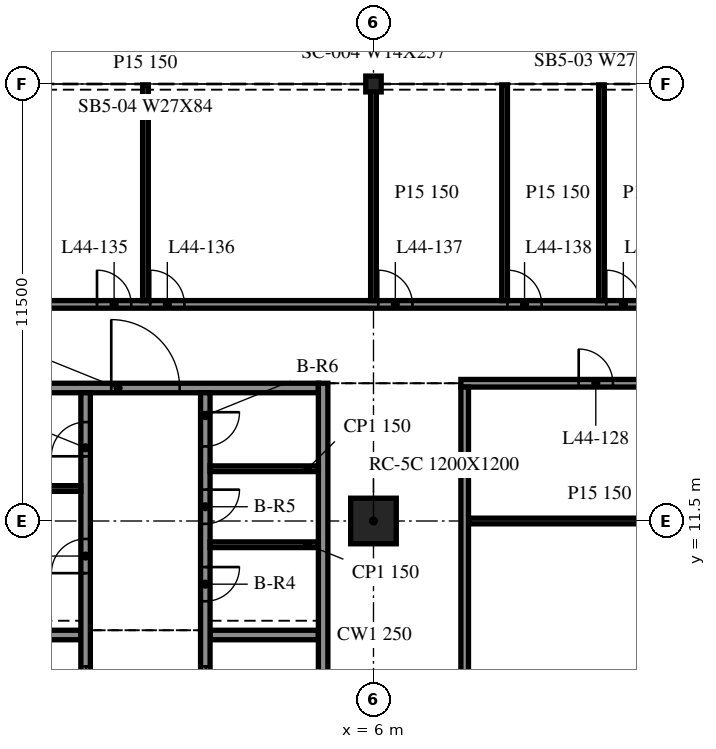
"""IFC4 building model, lengths in metres.
Left out: names, types, materials, properties, quantities, classifications, styles, units other than length and angle.
Written with IfcOpenShell. Run it as: python <this file> out.ifc"""

import sys

from ifc_helpers import new_model, si_unit, direction, frame, frame_2d, origin, origin_2d, place, context, subcontext, project, spatial, rectangle, i_section, extrude, element, fill, save


model = new_model("IFC4")
c1 = context("Model", 3, precision=1e-05, world=origin(), true_north=direction((0.0, 1.0)))
c2 = subcontext(c1, "Body", "Model", "MODEL_VIEW")
j1 = project(units=[si_unit("LENGTHUNIT", "METRE"), si_unit("PLANEANGLEUNIT", "RADIAN")], contexts=[c1])
p1 = place(None, origin())
s1 = spatial("IfcSite", under=j1, at=p1, CompositionType="ELEMENT")
p2 = place(p1, origin())
s2 = spatial("IfcBuilding", under=s1, at=p2, CompositionType="ELEMENT")
p3 = place(p2, frame((0.0, 0.0, 185.8)))
s3 = spatial("IfcBuildingStorey", under=s2, at=p3, CompositionType="ELEMENT", Elevation=185.8)
p4 = place(p3, frame((6.0, 11.5, -0.34), z_axis=(0.0, 0.0, 1.0), x_axis=(1.0, 0.0, 0.0)))
e1 = element("IfcColumn", 1, at=p4, inside=s3, PredefinedType="COLUMN", context=c2, shape_type="SweptSolid", body=[
    extrude(rectangle(XDim=1.2, YDim=1.2, at=origin_2d()), origin(), (0.0, 0.0, 1.0), 3.74),
])
p5 = place(p3, frame((6.0, 23.0, -0.34), z_axis=(0.0, 0.0, 1.0), x_axis=(1.0, 0.0, 0.0)))
e2 = element("IfcColumn", 2, at=p5, inside=s3, PredefinedType="COLUMN", context=c2, shape_type="SweptSolid", body=[
    extrude(i_section(OverallWidth=0.406, OverallDepth=0.417, WebThickness=0.03, FlangeThickness=0.048, at=origin_2d()), origin(), (0.0, 0.0, 1.0), 3.74),
])
p6 = place(p3, frame((4.675, -9.125, 0.0), z_axis=(0.0, 0.0, 1.0), x_axis=(0.0, 1.0, 0.0)))
e3 = element("IfcWall", 3, at=p6, inside=s3, PredefinedType="SOLIDWALL", context=c2, shape_type="SweptSolid", body=[
    extrude(rectangle(XDim=24.25, YDim=0.25, at=frame_2d((12.125, 0.0))), origin(), (0.0, 0.0, 1.0), 3.4),
])
p7 = place(p3, frame((-4.55, 15.0, 0.0), z_axis=(0.0, 0.0, 1.0), x_axis=(1.0, 0.0, 0.0)))
e4 = element("IfcWall", 4, at=p7, inside=s3, PredefinedType="SOLIDWALL", context=c2, shape_type="SweptSolid", body=[
    extrude(rectangle(XDim=9.1, YDim=0.25, at=frame_2d((4.55, 0.0))), origin(), (0.0, 0.0, 1.0), 3.4),
])
p8 = place(p7, frame((3.65, 0.0, 0.0)))
e5 = element("IfcOpeningElement", 5, at=p8, cuts=e4, PredefinedType="OPENING", context=c2, shape_type="SweptSolid", body=[
    extrude(rectangle(XDim=1.8, YDim=2.1, at=frame_2d((0.9, 1.05))), frame((0.0, 0.135, 0.0), z_axis=(0.0, -1.0, 0.0), x_axis=(1.0, 0.0, 0.0)), (0.0, 0.0, 1.0), 0.27),
])
p9 = place(p3, frame((-1.575, -8.875, 0.0), z_axis=(0.0, 0.0, 1.0), x_axis=(0.0, 1.0, 0.0)))
e6 = element("IfcWall", 6, at=p9, inside=s3, PredefinedType="SOLIDWALL", context=c2, shape_type="SweptSolid", body=[
    extrude(rectangle(XDim=23.75, YDim=0.25, at=frame_2d((11.875, 0.0))), origin(), (0.0, 0.0, 1.0), 3.4),
])
p10 = place(p9, frame((7.2, 0.0, 0.0)))
e7 = element("IfcOpeningElement", 7, at=p10, cuts=e6, PredefinedType="OPENING", context=c2, shape_type="SweptSolid", body=[
    extrude(rectangle(XDim=1.1, YDim=2.1, at=frame_2d((0.55, 1.05))), frame((0.0, 0.135, 0.0), z_axis=(0.0, -1.0, 0.0), x_axis=(1.0, 0.0, 0.0)), (0.0, 0.0, 1.0), 0.27),
])
p11 = place(p9, frame((9.95, 0.0, 0.0)))
e8 = element("IfcOpeningElement", 8, at=p11, cuts=e6, PredefinedType="OPENING", context=c2, shape_type="SweptSolid", body=[
    extrude(rectangle(XDim=1.1, YDim=2.1, at=frame_2d((0.55, 1.05))), frame((0.0, 0.135, 0.0), z_axis=(0.0, -1.0, 0.0), x_axis=(1.0, 0.0, 0.0)), (0.0, 0.0, 1.0), 0.27),
])
p12 = place(p9, frame((12.7, 0.0, 0.0)))
e9 = element("IfcOpeningElement", 9, at=p12, cuts=e6, PredefinedType="OPENING", context=c2, shape_type="SweptSolid", body=[
    extrude(rectangle(XDim=1.1, YDim=2.1, at=frame_2d((0.55, 1.05))), frame((0.0, 0.135, 0.0), z_axis=(0.0, -1.0, 0.0), x_axis=(1.0, 0.0, 0.0)), (0.0, 0.0, 1.0), 0.27),
])
p13 = place(p9, frame((15.45, 0.0, 0.0)))
e10 = element("IfcOpeningElement", 10, at=p13, cuts=e6, PredefinedType="OPENING", context=c2, shape_type="SweptSolid", body=[
    extrude(rectangle(XDim=1.1, YDim=2.1, at=frame_2d((0.55, 1.05))), frame((0.0, 0.135, 0.0), z_axis=(0.0, -1.0, 0.0), x_axis=(1.0, 0.0, 0.0)), (0.0, 0.0, 1.0), 0.27),
])
p14 = place(p9, frame((2.55, 0.0, 0.0)))
e11 = element("IfcOpeningElement", 11, at=p14, cuts=e6, PredefinedType="OPENING", context=c2, shape_type="SweptSolid", body=[
    extrude(rectangle(XDim=0.9, YDim=2.1, at=frame_2d((0.45, 1.05))), frame((0.0, 0.135, 0.0), z_axis=(0.0, -1.0, 0.0), x_axis=(1.0, 0.0, 0.0)), (0.0, 0.0, 1.0), 0.27),
])
p15 = place(p9, frame((19.002, 0.0, 0.0)))
e12 = element("IfcOpeningElement", 12, at=p15, cuts=e6, PredefinedType="OPENING", context=c2, shape_type="SweptSolid", body=[
    extrude(rectangle(XDim=0.9, YDim=2.1, at=frame_2d((0.45, 1.05))), frame((0.0, 0.135, 0.0), z_axis=(0.0, -1.0, 0.0), x_axis=(1.0, 0.0, 0.0)), (0.0, 0.0, 1.0), 0.27),
])
p16 = place(p9, frame((22.077, 0.0, 0.0)))
e13 = element("IfcOpeningElement", 13, at=p16, cuts=e6, PredefinedType="OPENING", context=c2, shape_type="SweptSolid", body=[
    extrude(rectangle(XDim=0.9, YDim=2.1, at=frame_2d((0.45, 1.05))), frame((0.0, 0.135, 0.0), z_axis=(0.0, -1.0, 0.0), x_axis=(1.0, 0.0, 0.0)), (0.0, 0.0, 1.0), 0.27),
])
p17 = place(p3, frame((1.575, 14.875, 0.0), z_axis=(0.0, 0.0, 1.0), x_axis=(0.0, -1.0, 0.0)))
e14 = element("IfcWall", 14, at=p17, inside=s3, PredefinedType="SOLIDWALL", context=c2, shape_type="SweptSolid", body=[
    extrude(rectangle(XDim=17.5, YDim=0.25, at=frame_2d((8.75, 0.0))), origin(), (0.0, 0.0, 1.0), 3.4),
])
p18 = place(p17, frame((15.45, 0.0, 0.0)))
e15 = element("IfcOpeningElement", 15, at=p18, cuts=e14, PredefinedType="OPENING", context=c2, shape_type="SweptSolid", body=[
    extrude(rectangle(XDim=1.1, YDim=2.1, at=frame_2d((0.55, 1.05))), frame((0.0, 0.135, 0.0), z_axis=(0.0, -1.0, 0.0), x_axis=(1.0, 0.0, 0.0)), (0.0, 0.0, 1.0), 0.27),
])
p19 = place(p17, frame((12.7, 0.0, 0.0)))
e16 = element("IfcOpeningElement", 16, at=p19, cuts=e14, PredefinedType="OPENING", context=c2, shape_type="SweptSolid", body=[
    extrude(rectangle(XDim=1.1, YDim=2.1, at=frame_2d((0.55, 1.05))), frame((0.0, 0.135, 0.0), z_axis=(0.0, -1.0, 0.0), x_axis=(1.0, 0.0, 0.0)), (0.0, 0.0, 1.0), 0.27),
])
p20 = place(p17, frame((9.95, 0.0, 0.0)))
e17 = element("IfcOpeningElement", 17, at=p20, cuts=e14, PredefinedType="OPENING", context=c2, shape_type="SweptSolid", body=[
    extrude(rectangle(XDim=1.1, YDim=2.1, at=frame_2d((0.55, 1.05))), frame((0.0, 0.135, 0.0), z_axis=(0.0, -1.0, 0.0), x_axis=(1.0, 0.0, 0.0)), (0.0, 0.0, 1.0), 0.27),
])
p21 = place(p17, frame((7.2, 0.0, 0.0)))
e18 = element("IfcOpeningElement", 18, at=p21, cuts=e14, PredefinedType="OPENING", context=c2, shape_type="SweptSolid", body=[
    extrude(rectangle(XDim=1.1, YDim=2.1, at=frame_2d((0.55, 1.05))), frame((0.0, 0.135, 0.0), z_axis=(0.0, -1.0, 0.0), x_axis=(1.0, 0.0, 0.0)), (0.0, 0.0, 1.0), 0.27),
])
p22 = place(p17, frame((4.587, 0.0, 0.0)))
e19 = element("IfcOpeningElement", 19, at=p22, cuts=e14, PredefinedType="OPENING", context=c2, shape_type="SweptSolid", body=[
    extrude(rectangle(XDim=0.9, YDim=2.1, at=frame_2d((0.45, 1.05))), frame((0.0, 0.135, 0.0), z_axis=(0.0, -1.0, 0.0), x_axis=(1.0, 0.0, 0.0)), (0.0, 0.0, 1.0), 0.27),
])
p23 = place(p17, frame((2.55, 0.0, 0.0)))
e20 = element("IfcOpeningElement", 20, at=p23, cuts=e14, PredefinedType="OPENING", context=c2, shape_type="SweptSolid", body=[
    extrude(rectangle(XDim=0.9, YDim=2.1, at=frame_2d((0.45, 1.05))), frame((0.0, 0.135, 0.0), z_axis=(0.0, -1.0, 0.0), x_axis=(1.0, 0.0, 0.0)), (0.0, 0.0, 1.0), 0.27),
])
p24 = place(p17, frame((0.512, 0.0, 0.0)))
e21 = element("IfcOpeningElement", 21, at=p24, cuts=e14, PredefinedType="OPENING", context=c2, shape_type="SweptSolid", body=[
    extrude(rectangle(XDim=0.9, YDim=2.1, at=frame_2d((0.45, 1.05))), frame((0.0, 0.135, 0.0), z_axis=(0.0, -1.0, 0.0), x_axis=(1.0, 0.0, 0.0)), (0.0, 0.0, 1.0), 0.27),
])
for number, where, z_axis, x_axis in (
    (22, (-4.55, 8.5, 0.0), (0.0, 0.0, 1.0), (1.0, 0.0, 0.0)),
    (23, (1.7, 8.5, 0.0), (0.0, 0.0, 1.0), (1.0, 0.0, 0.0)),
):
    element("IfcWall", number, at=place(p3, frame(where, z_axis=z_axis, x_axis=x_axis)), inside=s3, PredefinedType="SOLIDWALL", context=c2, shape_type="SweptSolid", body=[
        extrude(rectangle(XDim=2.85, YDim=0.25, at=frame_2d((1.425, 0.0))), origin(), (0.0, 0.0, 1.0), 3.4),
    ])
for number, where, z_axis, x_axis in (
    (24, (-4.55, 12.355, 0.0), (0.0, 0.0, 1.0), (1.0, 0.0, 0.0)),
    (25, (1.7, 10.875, 0.0), (0.0, 0.0, 1.0), (1.0, 0.0, 0.0)),
    (26, (1.7, 12.875, 0.0), (0.0, 0.0, 1.0), (1.0, 0.0, 0.0)),
):
    element("IfcWall", number, at=place(p3, frame(where, z_axis=z_axis, x_axis=x_axis)), inside=s3, PredefinedType="PARTITIONING", context=c2, shape_type="SweptSolid", body=[
        extrude(rectangle(XDim=2.85, YDim=0.15, at=frame_2d((1.425, 0.0))), origin(), (0.0, 0.0, 1.0), 3.4),
    ])
p25 = place(p3, frame((8.5, 11.5, 0.0), z_axis=(0.0, 0.0, 1.0), x_axis=(1.0, 0.0, 0.0)))
e27 = element("IfcWall", 27, at=p25, inside=s3, PredefinedType="PARTITIONING", context=c2, shape_type="SweptSolid", body=[
    extrude(rectangle(XDim=6.9, YDim=0.15, at=frame_2d((3.45, 0.0))), origin(), (0.0, 0.0, 1.0), 3.4),
])
p26 = place(p3, frame((8.3, 15.125, 0.0), z_axis=(0.0, 0.0, 1.0), x_axis=(1.0, 0.0, 0.0)))
e28 = element("IfcWall", 28, at=p26, inside=s3, PredefinedType="PARTITIONING", context=c2, shape_type="SweptSolid", body=[
    extrude(rectangle(XDim=7.3, YDim=0.2, at=frame_2d((3.65, 0.0))), origin(), (0.0, 0.0, 1.0), 3.4),
])
p27 = place(p26, frame((3.1, 0.0, 0.0)))
e29 = element("IfcOpeningElement", 29, at=p27, cuts=e28, PredefinedType="OPENING", context=c2, shape_type="SweptSolid", body=[
    extrude(rectangle(XDim=0.9, YDim=2.1, at=frame_2d((0.45, 1.05))), frame((0.0, 0.11, 0.0), z_axis=(0.0, -1.0, 0.0), x_axis=(1.0, 0.0, 0.0)), (0.0, 0.0, 1.0), 0.22),
])
p28 = place(p3, frame((-47.975, 17.2, 0.0), z_axis=(0.0, 0.0, 1.0), x_axis=(1.0, 0.0, 0.0)))
e30 = element("IfcWall", 30, at=p28, inside=s3, PredefinedType="PARTITIONING", context=c2, shape_type="SweptSolid", body=[
    extrude(rectangle(XDim=95.95, YDim=0.2, at=frame_2d((47.975, 0.0))), origin(), (0.0, 0.0, 1.0), 3.4),
])
p29 = place(p28, frame((7.7, 0.0, 0.0)))
e31 = element("IfcOpeningElement", 31, at=p29, cuts=e30, PredefinedType="OPENING", context=c2, shape_type="SweptSolid", body=[
    extrude(rectangle(XDim=0.9, YDim=2.1, at=frame_2d((0.45, 1.05))), frame((0.0, 0.11, 0.0), z_axis=(0.0, -1.0, 0.0), x_axis=(1.0, 0.0, 0.0)), (0.0, 0.0, 1.0), 0.22),
])
p30 = place(p28, frame((16.7, 0.0, 0.0)))
e32 = element("IfcOpeningElement", 32, at=p30, cuts=e30, PredefinedType="OPENING", context=c2, shape_type="SweptSolid", body=[
    extrude(rectangle(XDim=0.9, YDim=2.1, at=frame_2d((0.45, 1.05))), frame((0.0, 0.11, 0.0), z_axis=(0.0, -1.0, 0.0), x_axis=(1.0, 0.0, 0.0)), (0.0, 0.0, 1.0), 0.22),
])
p31 = place(p28, frame((22.7, 0.0, 0.0)))
e33 = element("IfcOpeningElement", 33, at=p31, cuts=e30, PredefinedType="OPENING", context=c2, shape_type="SweptSolid", body=[
    extrude(rectangle(XDim=0.9, YDim=2.1, at=frame_2d((0.45, 1.05))), frame((0.0, 0.11, 0.0), z_axis=(0.0, -1.0, 0.0), x_axis=(1.0, 0.0, 0.0)), (0.0, 0.0, 1.0), 0.22),
])
p32 = place(p28, frame((26.1, 0.0, 0.0)))
e34 = element("IfcOpeningElement", 34, at=p32, cuts=e30, PredefinedType="OPENING", context=c2, shape_type="SweptSolid", body=[
    extrude(rectangle(XDim=0.9, YDim=2.1, at=frame_2d((0.45, 1.05))), frame((0.0, 0.11, 0.0), z_axis=(0.0, -1.0, 0.0), x_axis=(1.0, 0.0, 0.0)), (0.0, 0.0, 1.0), 0.22),
])
p33 = place(p28, frame((28.7, 0.0, 0.0)))
e35 = element("IfcOpeningElement", 35, at=p33, cuts=e30, PredefinedType="OPENING", context=c2, shape_type="SweptSolid", body=[
    extrude(rectangle(XDim=0.9, YDim=2.1, at=frame_2d((0.45, 1.05))), frame((0.0, 0.11, 0.0), z_axis=(0.0, -1.0, 0.0), x_axis=(1.0, 0.0, 0.0)), (0.0, 0.0, 1.0), 0.22),
])
p34 = place(p28, frame((37.7, 0.0, 0.0)))
e36 = element("IfcOpeningElement", 36, at=p34, cuts=e30, PredefinedType="OPENING", context=c2, shape_type="SweptSolid", body=[
    extrude(rectangle(XDim=0.9, YDim=2.1, at=frame_2d((0.45, 1.05))), frame((0.0, 0.11, 0.0), z_axis=(0.0, -1.0, 0.0), x_axis=(1.0, 0.0, 0.0)), (0.0, 0.0, 1.0), 0.22),
])
p35 = place(p28, frame((46.7, 0.0, 0.0)))
e37 = element("IfcOpeningElement", 37, at=p35, cuts=e30, PredefinedType="OPENING", context=c2, shape_type="SweptSolid", body=[
    extrude(rectangle(XDim=0.9, YDim=2.1, at=frame_2d((0.45, 1.05))), frame((0.0, 0.11, 0.0), z_axis=(0.0, -1.0, 0.0), x_axis=(1.0, 0.0, 0.0)), (0.0, 0.0, 1.0), 0.22),
])
p36 = place(p28, frame((48.1, 0.0, 0.0)))
e38 = element("IfcOpeningElement", 38, at=p36, cuts=e30, PredefinedType="OPENING", context=c2, shape_type="SweptSolid", body=[
    extrude(rectangle(XDim=0.9, YDim=2.1, at=frame_2d((0.45, 1.05))), frame((0.0, 0.11, 0.0), z_axis=(0.0, -1.0, 0.0), x_axis=(1.0, 0.0, 0.0)), (0.0, 0.0, 1.0), 0.22),
])
p37 = place(p28, frame((54.1, 0.0, 0.0)))
e39 = element("IfcOpeningElement", 39, at=p37, cuts=e30, PredefinedType="OPENING", context=c2, shape_type="SweptSolid", body=[
    extrude(rectangle(XDim=0.9, YDim=2.1, at=frame_2d((0.45, 1.05))), frame((0.0, 0.11, 0.0), z_axis=(0.0, -1.0, 0.0), x_axis=(1.0, 0.0, 0.0)), (0.0, 0.0, 1.0), 0.22),
])
p38 = place(p28, frame((57.5, 0.0, 0.0)))
e40 = element("IfcOpeningElement", 40, at=p38, cuts=e30, PredefinedType="OPENING", context=c2, shape_type="SweptSolid", body=[
    extrude(rectangle(XDim=0.9, YDim=2.1, at=frame_2d((0.45, 1.05))), frame((0.0, 0.11, 0.0), z_axis=(0.0, -1.0, 0.0), x_axis=(1.0, 0.0, 0.0)), (0.0, 0.0, 1.0), 0.22),
])
p39 = place(p28, frame((60.1, 0.0, 0.0)))
e41 = element("IfcOpeningElement", 41, at=p39, cuts=e30, PredefinedType="OPENING", context=c2, shape_type="SweptSolid", body=[
    extrude(rectangle(XDim=0.9, YDim=2.1, at=frame_2d((0.45, 1.05))), frame((0.0, 0.11, 0.0), z_axis=(0.0, -1.0, 0.0), x_axis=(1.0, 0.0, 0.0)), (0.0, 0.0, 1.0), 0.22),
])
p40 = place(p28, frame((69.1, 0.0, 0.0)))
e42 = element("IfcOpeningElement", 42, at=p40, cuts=e30, PredefinedType="OPENING", context=c2, shape_type="SweptSolid", body=[
    extrude(rectangle(XDim=0.9, YDim=2.1, at=frame_2d((0.45, 1.05))), frame((0.0, 0.11, 0.0), z_axis=(0.0, -1.0, 0.0), x_axis=(1.0, 0.0, 0.0)), (0.0, 0.0, 1.0), 0.22),
])
p41 = place(p28, frame((78.1, 0.0, 0.0)))
e43 = element("IfcOpeningElement", 43, at=p41, cuts=e30, PredefinedType="OPENING", context=c2, shape_type="SweptSolid", body=[
    extrude(rectangle(XDim=0.9, YDim=2.1, at=frame_2d((0.45, 1.05))), frame((0.0, 0.11, 0.0), z_axis=(0.0, -1.0, 0.0), x_axis=(1.0, 0.0, 0.0)), (0.0, 0.0, 1.0), 0.22),
])
p42 = place(p28, frame((84.1, 0.0, 0.0)))
e44 = element("IfcOpeningElement", 44, at=p42, cuts=e30, PredefinedType="OPENING", context=c2, shape_type="SweptSolid", body=[
    extrude(rectangle(XDim=0.9, YDim=2.1, at=frame_2d((0.45, 1.05))), frame((0.0, 0.11, 0.0), z_axis=(0.0, -1.0, 0.0), x_axis=(1.0, 0.0, 0.0)), (0.0, 0.0, 1.0), 0.22),
])
p43 = place(p28, frame((87.5, 0.0, 0.0)))
e45 = element("IfcOpeningElement", 45, at=p43, cuts=e30, PredefinedType="OPENING", context=c2, shape_type="SweptSolid", body=[
    extrude(rectangle(XDim=0.9, YDim=2.1, at=frame_2d((0.45, 1.05))), frame((0.0, 0.11, 0.0), z_axis=(0.0, -1.0, 0.0), x_axis=(1.0, 0.0, 0.0)), (0.0, 0.0, 1.0), 0.22),
])
p44 = place(p28, frame((90.1, 0.0, 0.0)))
e46 = element("IfcOpeningElement", 46, at=p44, cuts=e30, PredefinedType="OPENING", context=c2, shape_type="SweptSolid", body=[
    extrude(rectangle(XDim=0.9, YDim=2.1, at=frame_2d((0.45, 1.05))), frame((0.0, 0.11, 0.0), z_axis=(0.0, -1.0, 0.0), x_axis=(1.0, 0.0, 0.0)), (0.0, 0.0, 1.0), 0.22),
])
for number, where, z_axis, x_axis in (
    (47, (0.0, 17.3, 0.0), (0.0, 0.0, 1.0), (0.0, 1.0, 0.0)),
    (48, (6.0, 17.3, 0.0), (0.0, 0.0, 1.0), (0.0, 1.0, 0.0)),
):
    element("IfcWall", number, at=place(p3, frame(where, z_axis=z_axis, x_axis=x_axis)), inside=s3, PredefinedType="PARTITIONING", context=c2, shape_type="SweptSolid", body=[
        extrude(rectangle(XDim=5.675, YDim=0.15, at=frame_2d((2.837, 0.0))), origin(), (0.0, 0.0, 1.0), 3.4),
    ])
p45 = place(p3, frame((8.4, -9.025, 0.0), z_axis=(0.0, 0.0, 1.0), x_axis=(0.0, 1.0, 0.0)))
e49 = element("IfcWall", 49, at=p45, inside=s3, PredefinedType="PARTITIONING", context=c2, shape_type="SweptSolid", body=[
    extrude(rectangle(XDim=24.05, YDim=0.2, at=frame_2d((12.025, 0.0))), origin(), (0.0, 0.0, 1.0), 3.4),
])
p46 = place(p45, frame((11.5, 0.0, 0.0)))
e50 = element("IfcOpeningElement", 50, at=p46, cuts=e49, PredefinedType="OPENING", context=c2, shape_type="SweptSolid", body=[
    extrude(rectangle(XDim=0.9, YDim=2.1, at=frame_2d((0.45, 1.05))), frame((0.0, 0.11, 0.0), z_axis=(0.0, -1.0, 0.0), x_axis=(1.0, 0.0, 0.0)), (0.0, 0.0, 1.0), 0.22),
])
for number, where, z_axis, x_axis in (
    (51, (9.45, 17.3, 0.0), (0.0, 0.0, 1.0), (0.0, 1.0, 0.0)),
    (52, (12.0, 17.3, 0.0), (0.0, 0.0, 1.0), (0.0, 1.0, 0.0)),
):
    element("IfcWall", number, at=place(p3, frame(where, z_axis=z_axis, x_axis=x_axis)), inside=s3, PredefinedType="PARTITIONING", context=c2, shape_type="SweptSolid", body=[
        extrude(rectangle(XDim=5.675, YDim=0.15, at=frame_2d((2.837, 0.0))), origin(), (0.0, 0.0, 1.0), 3.4),
    ])
p47 = place(p8, origin())
e53 = element("IfcDoor", 53, at=p47, inside=s3, OperationType="DOUBLE_DOOR_SINGLE_SWING", PredefinedType="DOOR", context=c2, shape_type="SweptSolid", body=[
    extrude(rectangle(XDim=1.8, YDim=2.1, at=frame_2d((0.9, 1.05))), frame((0.0, 0.025, 0.0), z_axis=(0.0, -1.0, 0.0), x_axis=(1.0, 0.0, 0.0)), (0.0, 0.0, 1.0), 0.05),
])
fill(e5, e53)
p48 = place(p21, origin())
e54 = element("IfcDoor", 54, at=p48, inside=s3, OperationType="DOUBLE_DOOR_SLIDING", PredefinedType="DOOR", context=c2, shape_type="SweptSolid", body=[
    extrude(rectangle(XDim=1.1, YDim=2.1, at=frame_2d((0.55, 1.05))), frame((0.0, 0.025, 0.0), z_axis=(0.0, -1.0, 0.0), x_axis=(1.0, 0.0, 0.0)), (0.0, 0.0, 1.0), 0.05),
])
fill(e18, e54)
p49 = place(p13, origin())
e55 = element("IfcDoor", 55, at=p49, inside=s3, OperationType="DOUBLE_DOOR_SLIDING", PredefinedType="DOOR", context=c2, shape_type="SweptSolid", body=[
    extrude(rectangle(XDim=1.1, YDim=2.1, at=frame_2d((0.55, 1.05))), frame((0.0, 0.025, 0.0), z_axis=(0.0, -1.0, 0.0), x_axis=(1.0, 0.0, 0.0)), (0.0, 0.0, 1.0), 0.05),
])
fill(e10, e55)
p50 = place(p15, origin())
e56 = element("IfcDoor", 56, at=p50, inside=s3, OperationType="SINGLE_SWING_RIGHT", PredefinedType="DOOR", context=c2, shape_type="SweptSolid", body=[
    extrude(rectangle(XDim=0.9, YDim=2.1, at=frame_2d((0.45, 1.05))), frame((0.0, 0.025, 0.0), z_axis=(0.0, -1.0, 0.0), x_axis=(1.0, 0.0, 0.0)), (0.0, 0.0, 1.0), 0.05),
])
fill(e12, e56)
p51 = place(p16, origin())
e57 = element("IfcDoor", 57, at=p51, inside=s3, OperationType="SINGLE_SWING_LEFT", PredefinedType="DOOR", context=c2, shape_type="SweptSolid", body=[
    extrude(rectangle(XDim=0.9, YDim=2.1, at=frame_2d((0.45, 1.05))), frame((0.0, 0.025, 0.0), z_axis=(0.0, -1.0, 0.0), x_axis=(1.0, 0.0, 0.0)), (0.0, 0.0, 1.0), 0.05),
])
fill(e13, e57)
p52 = place(p22, origin())
e58 = element("IfcDoor", 58, at=p52, inside=s3, OperationType="SINGLE_SWING_RIGHT", PredefinedType="DOOR", context=c2, shape_type="SweptSolid", body=[
    extrude(rectangle(XDim=0.9, YDim=2.1, at=frame_2d((0.45, 1.05))), frame((0.0, 0.025, 0.0), z_axis=(0.0, -1.0, 0.0), x_axis=(1.0, 0.0, 0.0)), (0.0, 0.0, 1.0), 0.05),
])
fill(e19, e58)
p53 = place(p23, origin())
e59 = element("IfcDoor", 59, at=p53, inside=s3, OperationType="SINGLE_SWING_LEFT", PredefinedType="DOOR", context=c2, shape_type="SweptSolid", body=[
    extrude(rectangle(XDim=0.9, YDim=2.1, at=frame_2d((0.45, 1.05))), frame((0.0, 0.025, 0.0), z_axis=(0.0, -1.0, 0.0), x_axis=(1.0, 0.0, 0.0)), (0.0, 0.0, 1.0), 0.05),
])
fill(e20, e59)
p54 = place(p24, origin())
e60 = element("IfcDoor", 60, at=p54, inside=s3, OperationType="SINGLE_SWING_RIGHT", PredefinedType="DOOR", context=c2, shape_type="SweptSolid", body=[
    extrude(rectangle(XDim=0.9, YDim=2.1, at=frame_2d((0.45, 1.05))), frame((0.0, 0.025, 0.0), z_axis=(0.0, -1.0, 0.0), x_axis=(1.0, 0.0, 0.0)), (0.0, 0.0, 1.0), 0.05),
])
fill(e21, e60)
p55 = place(p27, origin())
e61 = element("IfcDoor", 61, at=p55, inside=s3, OperationType="SINGLE_SWING_RIGHT", PredefinedType="DOOR", context=c2, shape_type="SweptSolid", body=[
    extrude(rectangle(XDim=0.9, YDim=2.1, at=frame_2d((0.45, 1.05))), frame((0.0, 0.025, 0.0), z_axis=(0.0, -1.0, 0.0), x_axis=(1.0, 0.0, 0.0)), (0.0, 0.0, 1.0), 0.05),
])
fill(e29, e61)
p56 = place(p35, origin())
e62 = element("IfcDoor", 62, at=p56, inside=s3, OperationType="SINGLE_SWING_LEFT", PredefinedType="DOOR", context=c2, shape_type="SweptSolid", body=[
    extrude(rectangle(XDim=0.9, YDim=2.1, at=frame_2d((0.45, 1.05))), frame((0.0, 0.025, 0.0), z_axis=(0.0, -1.0, 0.0), x_axis=(1.0, 0.0, 0.0)), (0.0, 0.0, 1.0), 0.05),
])
fill(e37, e62)
p57 = place(p36, origin())
e63 = element("IfcDoor", 63, at=p57, inside=s3, OperationType="SINGLE_SWING_RIGHT", PredefinedType="DOOR", context=c2, shape_type="SweptSolid", body=[
    extrude(rectangle(XDim=0.9, YDim=2.1, at=frame_2d((0.45, 1.05))), frame((0.0, 0.025, 0.0), z_axis=(0.0, -1.0, 0.0), x_axis=(1.0, 0.0, 0.0)), (0.0, 0.0, 1.0), 0.05),
])
fill(e38, e63)
p58 = place(p37, origin())
e64 = element("IfcDoor", 64, at=p58, inside=s3, OperationType="SINGLE_SWING_RIGHT", PredefinedType="DOOR", context=c2, shape_type="SweptSolid", body=[
    extrude(rectangle(XDim=0.9, YDim=2.1, at=frame_2d((0.45, 1.05))), frame((0.0, 0.025, 0.0), z_axis=(0.0, -1.0, 0.0), x_axis=(1.0, 0.0, 0.0)), (0.0, 0.0, 1.0), 0.05),
])
fill(e39, e64)
p59 = place(p38, origin())
e65 = element("IfcDoor", 65, at=p59, inside=s3, OperationType="SINGLE_SWING_RIGHT", PredefinedType="DOOR", context=c2, shape_type="SweptSolid", body=[
    extrude(rectangle(XDim=0.9, YDim=2.1, at=frame_2d((0.45, 1.05))), frame((0.0, 0.025, 0.0), z_axis=(0.0, -1.0, 0.0), x_axis=(1.0, 0.0, 0.0)), (0.0, 0.0, 1.0), 0.05),
])
fill(e40, e65)
p60 = place(p39, origin())
e66 = element("IfcDoor", 66, at=p60, inside=s3, OperationType="SINGLE_SWING_RIGHT", PredefinedType="DOOR", context=c2, shape_type="SweptSolid", body=[
    extrude(rectangle(XDim=0.9, YDim=2.1, at=frame_2d((0.45, 1.05))), frame((0.0, 0.025, 0.0), z_axis=(0.0, -1.0, 0.0), x_axis=(1.0, 0.0, 0.0)), (0.0, 0.0, 1.0), 0.05),
])
fill(e41, e66)
save(model, sys.argv[1])
